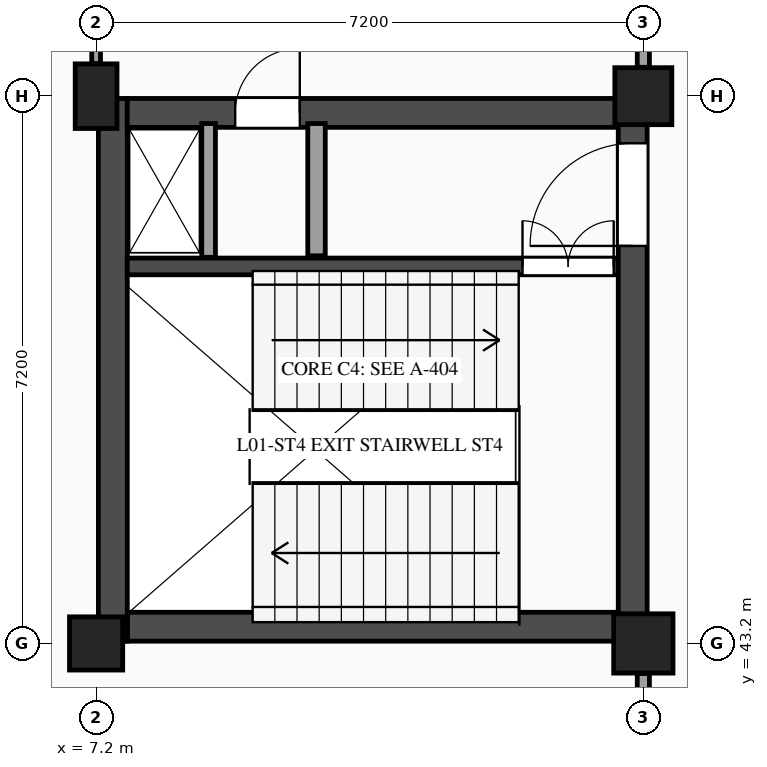
"""IFC4 building model, lengths in metres.
Left out: names, types, materials, properties, quantities, classifications, styles, units other than length and angle.
Written with IfcOpenShell. Run it as: python <this file> out.ifc"""

import sys

from ifc_helpers import new_model, si_unit, direction, frame, frame_2d, origin, origin_2d, place, context, subcontext, project, spatial, rectangle, extrude, element, fill, save


model = new_model("IFC4")
c1 = context("Model", 3, precision=1e-05, world=origin(), true_north=direction((0.0, 1.0)))
c2 = subcontext(c1, "Body", "Model", "MODEL_VIEW")
j1 = project(units=[si_unit("LENGTHUNIT", "METRE"), si_unit("PLANEANGLEUNIT", "RADIAN")], contexts=[c1])
p1 = place(None, origin())
s1 = spatial("IfcSite", under=j1, at=p1, CompositionType="ELEMENT")
p2 = place(p1, origin())
s2 = spatial("IfcBuilding", under=s1, at=p2, CompositionType="ELEMENT")
p3 = place(p2, frame((0.0, 0.0, 5.4)))
s3 = spatial("IfcBuildingStorey", under=s2, at=p3, CompositionType="ELEMENT", Elevation=5.4)
p4 = place(p3, frame((7.2, 43.2, 0.0), z_axis=(0.0, 0.0, 1.0), x_axis=(1.0, 0.0, 0.0)))
e1 = element("IfcColumn", 1, at=p4, inside=s3, PredefinedType="COLUMN", context=c2, shape_type="SweptSolid", body=[
    extrude(rectangle(XDim=0.7, YDim=0.7, at=origin_2d()), origin(), (0.0, 0.0, 1.0), 4.5),
])
p5 = place(p3, frame((7.2, 50.4, 0.0), z_axis=(0.0, 0.0, 1.0), x_axis=(1.0, 0.0, 0.0)))
e2 = element("IfcColumn", 2, at=p5, inside=s3, PredefinedType="COLUMN", context=c2, shape_type="SweptSolid", body=[
    extrude(rectangle(XDim=0.55, YDim=0.85, at=origin_2d()), origin(), (0.0, 0.0, 1.0), 4.5),
])
p6 = place(p3, frame((14.4, 43.2, 0.0), z_axis=(0.0, 0.0, 1.0), x_axis=(1.0, 0.0, 0.0)))
e3 = element("IfcColumn", 3, at=p6, inside=s3, PredefinedType="COLUMN", context=c2, shape_type="SweptSolid", body=[
    extrude(rectangle(XDim=0.78, YDim=0.78, at=origin_2d()), origin(), (0.0, 0.0, 1.0), 4.5),
])
p7 = place(p3, frame((14.4, 50.4, 0.0), z_axis=(0.0, 0.0, 1.0), x_axis=(1.0, 0.0, 0.0)))
e4 = element("IfcColumn", 4, at=p7, inside=s3, PredefinedType="COLUMN", context=c2, shape_type="SweptSolid", body=[
    extrude(rectangle(XDim=0.75, YDim=0.75, at=origin_2d()), origin(), (0.0, 0.0, 1.0), 4.5),
])
p8 = place(p3, frame((7.61, 43.42, 0.0), z_axis=(0.0, 0.0, 1.0), x_axis=(1.0, 0.0, 0.0)))
e5 = element("IfcWall", 5, at=p8, inside=s3, PredefinedType="SHEAR", context=c2, shape_type="SweptSolid", body=[
    extrude(rectangle(XDim=6.46, YDim=0.38, at=frame_2d((3.23, 0.0))), origin(), (0.0, 0.0, 1.0), 4.21),
])
p9 = place(p3, frame((7.42, 50.37, 0.0), z_axis=(0.0, 0.0, 1.0), x_axis=(0.0, -1.0, 0.0)))
e6 = element("IfcWall", 6, at=p9, inside=s3, PredefinedType="SHEAR", context=c2, shape_type="SweptSolid", body=[
    extrude(rectangle(XDim=7.14, YDim=0.38, at=frame_2d((3.57, 0.0))), origin(), (0.0, 0.0, 1.0), 4.21),
])
p10 = place(p3, frame((7.61, 50.18, 0.0), z_axis=(0.0, 0.0, 1.0), x_axis=(1.0, 0.0, 0.0)))
e7 = element("IfcWall", 7, at=p10, inside=s3, PredefinedType="SHEAR", context=c2, shape_type="SweptSolid", body=[
    extrude(rectangle(XDim=6.46, YDim=0.38, at=frame_2d((3.23, 0.0))), origin(), (0.0, 0.0, 1.0), 4.21),
])
p11 = place(p10, frame((1.42, 0.0, 0.0)))
e8 = element("IfcOpeningElement", 8, at=p11, cuts=e7, PredefinedType="OPENING", context=c2, shape_type="SweptSolid", body=[
    extrude(rectangle(XDim=0.85, YDim=2.1, at=frame_2d((0.425, 1.05))), frame((0.0, 0.2, 0.0), z_axis=(0.0, -1.0, 0.0), x_axis=(1.0, 0.0, 0.0)), (0.0, 0.0, 1.0), 0.4),
])
p12 = place(p3, frame((7.61, 48.16, 0.0), z_axis=(0.0, 0.0, 1.0), x_axis=(1.0, 0.0, 0.0)))
e9 = element("IfcWall", 9, at=p12, inside=s3, PredefinedType="SHEAR", context=c2, shape_type="SweptSolid", body=[
    extrude(rectangle(XDim=6.46, YDim=0.22, at=frame_2d((3.23, 0.0))), origin(), (0.0, 0.0, 1.0), 4.21),
])
p13 = place(p12, frame((5.2, 0.0, 0.0)))
e10 = element("IfcOpeningElement", 10, at=p13, cuts=e9, PredefinedType="OPENING", context=c2, shape_type="SweptSolid", body=[
    extrude(rectangle(XDim=1.2, YDim=2.2, at=frame_2d((0.6, 1.1))), frame((0.0, 0.12, 0.0), z_axis=(0.0, -1.0, 0.0), x_axis=(1.0, 0.0, 0.0)), (0.0, 0.0, 1.0), 0.24),
])
p14 = place(p3, frame((10.1, 48.3, 0.0), z_axis=(0.0, 0.0, 1.0), x_axis=(0.0, 1.0, 0.0)))
e11 = element("IfcWall", 11, at=p14, inside=s3, PredefinedType="PARTITIONING", context=c2, shape_type="SweptSolid", body=[
    extrude(rectangle(XDim=1.74, YDim=0.23, at=frame_2d((0.87, 0.0))), origin(), (0.0, 0.0, 1.0), 4.21),
])
p15 = place(p3, frame((8.68, 48.28, 0.0), z_axis=(0.0, 0.0, 1.0), x_axis=(0.0, 1.0, 0.0)))
e12 = element("IfcWall", 12, at=p15, inside=s3, PredefinedType="PARTITIONING", context=c2, shape_type="SweptSolid", body=[
    extrude(rectangle(XDim=1.76, YDim=0.18, at=frame_2d((0.88, 0.0))), origin(), (0.0, 0.0, 1.0), 4.21),
])
p16 = place(p3, frame((14.26, 43.23, 0.0), z_axis=(0.0, 0.0, 1.0), x_axis=(0.0, 1.0, 0.0)))
e13 = element("IfcWall", 13, at=p16, inside=s3, PredefinedType="SHEAR", context=c2, shape_type="SweptSolid", body=[
    extrude(rectangle(XDim=7.14, YDim=0.38, at=frame_2d((3.57, 0.0))), origin(), (0.0, 0.0, 1.0), 4.21),
])
p17 = place(p16, frame((5.2, 0.0, 0.0)))
e14 = element("IfcOpeningElement", 14, at=p17, cuts=e13, PredefinedType="OPENING", context=c2, shape_type="SweptSolid", body=[
    extrude(rectangle(XDim=1.35, YDim=2.15, at=frame_2d((0.675, 1.075))), frame((0.0, 0.2, 0.0), z_axis=(0.0, -1.0, 0.0), x_axis=(1.0, 0.0, 0.0)), (0.0, 0.0, 1.0), 0.4),
])
p18 = place(p3, frame((7.2, 50.83, 0.0), z_axis=(0.0, 0.0, 1.0), x_axis=(0.0, 1.0, 0.0)))
e15 = element("IfcWall", 15, at=p18, inside=s3, PredefinedType="PARTITIONING", context=c2, shape_type="SweptSolid", body=[
    extrude(rectangle(XDim=6.465, YDim=0.115, at=frame_2d((3.232, 0.0))), origin(), (0.0, 0.0, 1.0), 3.525),
])
p19 = place(p18, frame((2.452, 0.0, 0.0)))
e16 = element("IfcOpeningElement", 16, at=p19, cuts=e15, PredefinedType="OPENING", context=c2, shape_type="SweptSolid", body=[
    extrude(rectangle(XDim=1.56, YDim=2.25, at=frame_2d((0.78, 1.125))), frame((0.0, 0.067, 0.0), z_axis=(0.0, -1.0, 0.0), x_axis=(1.0, 0.0, 0.0)), (0.0, 0.0, 1.0), 0.135),
])
p20 = place(p3, frame((14.4, 36.305, 0.0), z_axis=(0.0, 0.0, 1.0), x_axis=(0.0, 1.0, 0.0)))
e17 = element("IfcWall", 17, at=p20, inside=s3, PredefinedType="PARTITIONING", context=c2, shape_type="SweptSolid", body=[
    extrude(rectangle(XDim=6.5, YDim=0.16, at=frame_2d((3.25, 0.0))), origin(), (0.0, 0.0, 1.0), 3.58),
])
p21 = place(p3, frame((14.4, 50.78, 0.0), z_axis=(0.0, 0.0, 1.0), x_axis=(0.0, 1.0, 0.0)))
e18 = element("IfcWall", 18, at=p21, inside=s3, PredefinedType="PARTITIONING", context=c2, shape_type="SweptSolid", body=[
    extrude(rectangle(XDim=6.455, YDim=0.16, at=frame_2d((3.228, 0.0))), origin(), (0.0, 0.0, 1.0), 3.525),
])
p22 = place(p11, origin())
e19 = element("IfcDoor", 19, at=p22, inside=s3, OperationType="SINGLE_SWING_RIGHT", PredefinedType="DOOR", context=c2, shape_type="SweptSolid", body=[
    extrude(rectangle(XDim=0.85, YDim=2.1, at=frame_2d((0.425, 1.05))), frame((0.0, 0.025, 0.0), z_axis=(0.0, -1.0, 0.0), x_axis=(1.0, 0.0, 0.0)), (0.0, 0.0, 1.0), 0.05),
])
fill(e8, e19)
p23 = place(p13, origin())
e20 = element("IfcDoor", 20, at=p23, inside=s3, OperationType="DOUBLE_DOOR_SINGLE_SWING", PredefinedType="DOOR", context=c2, shape_type="SweptSolid", body=[
    extrude(rectangle(XDim=1.2, YDim=2.2, at=frame_2d((0.6, 1.1))), frame((0.0, 0.025, 0.0), z_axis=(0.0, -1.0, 0.0), x_axis=(1.0, 0.0, 0.0)), (0.0, 0.0, 1.0), 0.05),
])
fill(e10, e20)
p24 = place(p17, origin())
e21 = element("IfcDoor", 21, at=p24, inside=s3, OperationType="SINGLE_SWING_LEFT", PredefinedType="DOOR", context=c2, shape_type="SweptSolid", body=[
    extrude(rectangle(XDim=1.35, YDim=2.15, at=frame_2d((0.675, 1.075))), frame((0.0, 0.025, 0.0), z_axis=(0.0, -1.0, 0.0), x_axis=(1.0, 0.0, 0.0)), (0.0, 0.0, 1.0), 0.05),
])
fill(e14, e21)
save(model, sys.argv[1])
